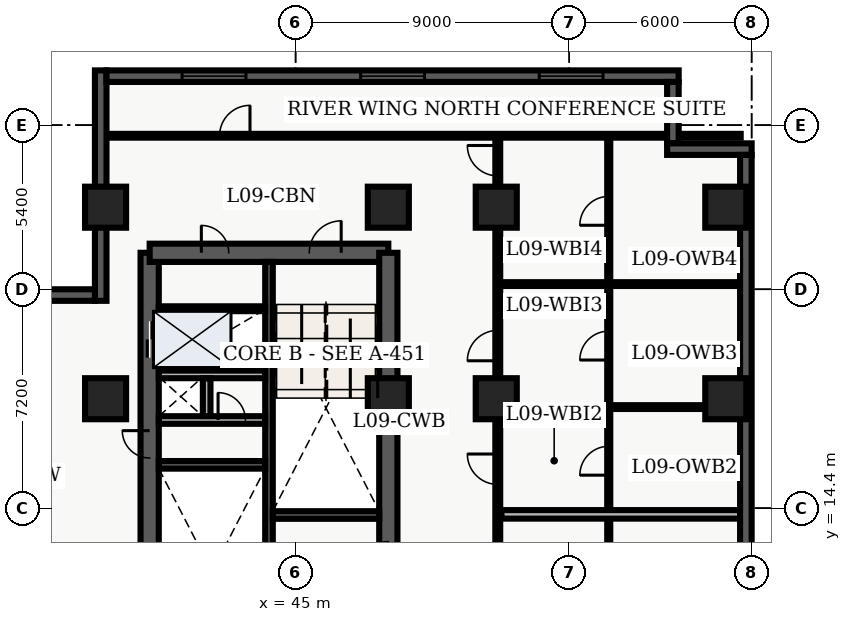
"""IFC4 building model, lengths in metres.
Left out: names, types, materials, properties, quantities, classifications, styles, units other than length and angle.
Written with IfcOpenShell. Run it as: python <this file> out.ifc"""

import sys

from ifc_helpers import new_model, entity, si_unit, converted_unit, direction, frame, origin_with_axes, origin_2d_with_axis, place, context, subcontext, project, spatial, polyline, rectangle, outline, extrude, element, fill, save


model = new_model("IFC4")
c1 = context("Model", 3, precision=1e-05, world=origin_with_axes(), true_north=direction((0.0, 1.0)))
c2 = subcontext(c1, "Body", "Model", "MODEL_VIEW")
j1 = project(units=[si_unit("LENGTHUNIT", "METRE"), converted_unit("PLANEANGLEUNIT", "DEGREE", entity("IfcPlaneAngleMeasure", 0.017), si_unit("PLANEANGLEUNIT", "RADIAN"), dimensions=[0, 0, 0, 0, 0, 0, 0])], contexts=[c1])
p1 = place(None, origin_with_axes())
s1 = spatial("IfcSite", under=j1, at=p1, CompositionType="ELEMENT")
p2 = place(p1, origin_with_axes())
s2 = spatial("IfcBuilding", under=s1, at=p2, CompositionType="ELEMENT")
p3 = place(p2, frame((0.0, 0.0, 40.5), z_axis=(0.0, 0.0, 1.0), x_axis=(1.0, 0.0, 0.0)))
s3 = spatial("IfcBuildingStorey", under=s2, at=p3, CompositionType="ELEMENT", Elevation=40.5)
p4 = place(p3, frame((40.2, 7.2, 0.0), z_axis=(0.0, 0.0, 1.0), x_axis=(0.0, 1.0, 0.0)))
e1 = element("IfcWall", 1, at=p4, inside=s3, PredefinedType="SHEAR", context=c2, shape_type="SweptSolid", body=[
    extrude(outline(polyline([(0.0, -0.3), (15.6, -0.3), (15.6, 0.3), (0.0, 0.3), (0.0, -0.3)])), origin_with_axes(), (0.0, 0.0, 1.0), 3.66),
])
p5 = place(p4, frame((12.75, 0.0, 0.0), z_axis=(0.0, 0.0, 1.0), x_axis=(1.0, 0.0, 0.0)))
e2 = element("IfcOpeningElement", 2, at=p5, cuts=e1, PredefinedType="OPENING", context=c2, shape_type="SweptSolid", body=[
    extrude(rectangle(XDim=1.2, YDim=0.62, at=origin_2d_with_axis()), origin_with_axes(), (0.0, 0.0, 1.0), 2.15),
])
p6 = place(p4, frame((9.3, 0.0, 0.0), z_axis=(0.0, 0.0, 1.0), x_axis=(1.0, 0.0, 0.0)))
e3 = element("IfcOpeningElement", 3, at=p6, cuts=e1, PredefinedType="OPENING", context=c2, shape_type="SweptSolid", body=[
    extrude(rectangle(XDim=0.9, YDim=0.62, at=origin_2d_with_axis()), origin_with_axes(), (0.0, 0.0, 1.0), 2.15),
])
p7 = place(p3, frame((40.2, 22.8, 0.0), z_axis=(0.0, 0.0, 1.0), x_axis=(1.0, 0.0, 0.0)))
e4 = element("IfcWall", 4, at=p7, inside=s3, PredefinedType="SHEAR", context=c2, shape_type="SweptSolid", body=[
    extrude(outline(polyline([(0.0, -0.3), (7.85, -0.3), (7.85, 0.3), (0.0, 0.3), (0.0, -0.3)])), origin_with_axes(), (0.0, 0.0, 1.0), 3.66),
])
p8 = place(p7, frame((5.775, 0.0, 0.0), z_axis=(0.0, 0.0, 1.0), x_axis=(1.0, 0.0, 0.0)))
e5 = element("IfcOpeningElement", 5, at=p8, cuts=e4, PredefinedType="OPENING", context=c2, shape_type="SweptSolid", body=[
    extrude(rectangle(XDim=1.05, YDim=0.62, at=origin_2d_with_axis()), origin_with_axes(), (0.0, 0.0, 1.0), 2.15),
])
p9 = place(p7, frame((2.15, 0.0, 0.0), z_axis=(0.0, 0.0, 1.0), x_axis=(1.0, 0.0, 0.0)))
e6 = element("IfcOpeningElement", 6, at=p9, cuts=e4, PredefinedType="OPENING", context=c2, shape_type="SweptSolid", body=[
    extrude(rectangle(XDim=0.9, YDim=0.62, at=origin_2d_with_axis()), origin_with_axes(), (0.0, 0.0, 1.0), 2.15),
])
p10 = place(p3, frame((48.05, 7.2, 0.0), z_axis=(0.0, 0.0, 1.0), x_axis=(0.0, 1.0, 0.0)))
e7 = element("IfcWall", 7, at=p10, inside=s3, PredefinedType="SHEAR", context=c2, shape_type="SweptSolid", body=[
    extrude(outline(polyline([(0.0, -0.3), (15.6, -0.3), (15.6, 0.3), (0.0, 0.3), (0.0, -0.3)])), origin_with_axes(), (0.0, 0.0, 1.0), 3.66),
])
p11 = place(p10, frame((1.425, 0.0, 0.0), z_axis=(0.0, 0.0, 1.0), x_axis=(1.0, 0.0, 0.0)))
e8 = element("IfcOpeningElement", 8, at=p11, cuts=e7, PredefinedType="OPENING", context=c2, shape_type="SweptSolid", body=[
    extrude(rectangle(XDim=1.05, YDim=0.62, at=origin_2d_with_axis()), origin_with_axes(), (0.0, 0.0, 1.0), 2.15),
])
p12 = place(p10, frame((3.475, 0.0, 0.0), z_axis=(0.0, 0.0, 1.0), x_axis=(1.0, 0.0, 0.0)))
e9 = element("IfcOpeningElement", 9, at=p12, cuts=e7, PredefinedType="OPENING", context=c2, shape_type="SweptSolid", body=[
    extrude(rectangle(XDim=1.05, YDim=0.62, at=origin_2d_with_axis()), origin_with_axes(), (0.0, 0.0, 1.0), 2.15),
])
p13 = place(p10, frame((5.625, 0.0, 0.0), z_axis=(0.0, 0.0, 1.0), x_axis=(1.0, 0.0, 0.0)))
e10 = element("IfcOpeningElement", 10, at=p13, cuts=e7, PredefinedType="OPENING", context=c2, shape_type="SweptSolid", body=[
    extrude(rectangle(XDim=0.95, YDim=0.62, at=origin_2d_with_axis()), origin_with_axes(), (0.0, 0.0, 1.0), 2.15),
])
p14 = place(p3, frame((44.125, 7.5, 0.0), z_axis=(0.0, 0.0, 1.0), x_axis=(0.0, 1.0, 0.0)))
e11 = element("IfcWall", 11, at=p14, inside=s3, PredefinedType="SHEAR", context=c2, shape_type="SweptSolid", body=[
    extrude(outline(polyline([(0.0, -0.125), (15.0, -0.125), (15.0, 0.125), (0.0, 0.125), (0.0, -0.125)])), origin_with_axes(), (0.0, 0.0, 1.0), 3.66),
])
for number, where, z_axis, x_axis in (
    (12, (40.5, 15.825, 0.0), (0.0, 0.0, 1.0), (1.0, 0.0, 0.0)),
    (13, (44.25, 14.175, 0.0), (0.0, 0.0, 1.0), (1.0, 0.0, 0.0)),
):
    element("IfcWall", number, at=place(p3, frame(where, z_axis=z_axis, x_axis=x_axis)), inside=s3, PredefinedType="SHEAR", context=c2, shape_type="SweptSolid", body=[
        extrude(outline(polyline([(0.0, -0.125), (3.5, -0.125), (3.5, 0.125), (0.0, 0.125), (0.0, -0.125)])), origin_with_axes(), (0.0, 0.0, 1.0), 3.66),
    ])
p15 = place(p3, frame((40.5, 17.3, 0.0), z_axis=(0.0, 0.0, 1.0), x_axis=(1.0, 0.0, 0.0)))
e14 = element("IfcWall", 14, at=p15, inside=s3, PredefinedType="SOLIDWALL", context=c2, shape_type="SweptSolid", body=[
    extrude(outline(polyline([(0.0, -0.125), (3.5, -0.125), (3.5, 0.125), (0.0, 0.125), (0.0, -0.125)])), origin_with_axes(), (0.0, 0.0, 1.0), 2.7),
])
p16 = place(p15, frame((2.4, 0.0, 0.0), z_axis=(0.0, 0.0, 1.0), x_axis=(1.0, 0.0, 0.0)))
e15 = element("IfcOpeningElement", 15, at=p16, cuts=e14, PredefinedType="OPENING", context=c2, shape_type="SweptSolid", body=[
    extrude(rectangle(XDim=0.9, YDim=0.27, at=origin_2d_with_axis()), origin_with_axes(), (0.0, 0.0, 1.0), 2.15),
])
p17 = place(p3, frame((40.5, 18.8, 0.0), z_axis=(0.0, 0.0, 1.0), x_axis=(1.0, 0.0, 0.0)))
e16 = element("IfcWall", 16, at=p17, inside=s3, PredefinedType="SOLIDWALL", context=c2, shape_type="SweptSolid", body=[
    extrude(outline(polyline([(0.0, -0.125), (3.5, -0.125), (3.5, 0.125), (0.0, 0.125), (0.0, -0.125)])), origin_with_axes(), (0.0, 0.0, 1.0), 2.7),
])
p18 = place(p3, frame((42.075, 17.43, 0.0), z_axis=(0.0, 0.0, 1.0), x_axis=(0.0, 1.0, 0.0)))
e17 = element("IfcWall", 17, at=p18, inside=s3, PredefinedType="SOLIDWALL", context=c2, shape_type="SweptSolid", body=[
    extrude(outline(polyline([(0.0, -0.125), (1.24, -0.125), (1.24, 0.125), (0.0, 0.125), (0.0, -0.125)])), origin_with_axes(), (0.0, 0.0, 1.0), 2.7),
])
for number, where, z_axis, x_axis in (
    (18, (38.75, 18.0, 0.0), (0.0, 0.0, 1.0), (1.0, 0.0, 0.0)),
    (19, (38.75, 24.3, 0.0), (0.0, 0.0, 1.0), (1.0, 0.0, 0.0)),
    (20, (48.05, 18.0, 0.0), (0.0, 0.0, 1.0), (1.0, 0.0, 0.0)),
    (21, (48.05, 24.3, 0.0), (0.0, 0.0, 1.0), (1.0, 0.0, 0.0)),
    (22, (51.6, 18.0, 0.0), (0.0, 0.0, 1.0), (1.0, 0.0, 0.0)),
    (23, (51.6, 24.3, 0.0), (0.0, 0.0, 1.0), (1.0, 0.0, 0.0)),
    (24, (59.15, 18.0, 0.0), (0.0, 0.0, 1.0), (1.0, 0.0, 0.0)),
    (25, (59.15, 24.3, 0.0), (0.0, 0.0, 1.0), (1.0, 0.0, 0.0)),
):
    element("IfcColumn", number, at=place(p3, frame(where, z_axis=z_axis, x_axis=x_axis)), inside=s3, PredefinedType="COLUMN", context=c2, shape_type="SweptSolid", body=[
        extrude(rectangle(XDim=1.35, YDim=1.35, at=origin_2d_with_axis()), origin_with_axes(), (0.0, 0.0, 1.0), 3.9),
    ])
p19 = place(p3, frame((40.5, 20.96, 0.0), z_axis=(0.0, 0.0, 1.0), x_axis=(1.0, 0.0, 0.0)))
e26 = element("IfcWall", 26, at=p19, inside=s3, PredefinedType="PARTITIONING", context=c2, shape_type="SweptSolid", body=[
    extrude(outline(polyline([(0.0, -0.08), (3.5, -0.08), (3.5, 0.08), (0.0, 0.08), (0.0, -0.08)])), origin_with_axes(), (0.0, 0.0, 1.0), 2.7),
])
p20 = place(p3, frame((51.65, 7.85, 0.0), z_axis=(0.0, 0.0, 1.0), x_axis=(0.0, 1.0, 0.0)))
e27 = element("IfcWall", 27, at=p20, inside=s3, PredefinedType="PARTITIONING", context=c2, shape_type="SweptSolid", body=[
    extrude(outline(polyline([(0.0, -0.08), (18.8, -0.08), (18.8, 0.08), (0.0, 0.08), (0.0, -0.08)])), origin_with_axes(), (0.0, 0.0, 1.0), 2.7),
])
p21 = place(p20, frame((4.453, 0.0, 0.0), z_axis=(0.0, 0.0, 1.0), x_axis=(1.0, 0.0, 0.0)))
e28 = element("IfcOpeningElement", 28, at=p21, cuts=e27, PredefinedType="OPENING", context=c2, shape_type="SweptSolid", body=[
    extrude(rectangle(XDim=1.0, YDim=0.18, at=origin_2d_with_axis()), origin_with_axes(), (0.0, 0.0, 1.0), 2.15),
])
p22 = place(p20, frame((7.831, 0.0, 0.0), z_axis=(0.0, 0.0, 1.0), x_axis=(1.0, 0.0, 0.0)))
e29 = element("IfcOpeningElement", 29, at=p22, cuts=e27, PredefinedType="OPENING", context=c2, shape_type="SweptSolid", body=[
    extrude(rectangle(XDim=1.0, YDim=0.18, at=origin_2d_with_axis()), origin_with_axes(), (0.0, 0.0, 1.0), 2.15),
])
p23 = place(p20, frame((11.898, 0.0, 0.0), z_axis=(0.0, 0.0, 1.0), x_axis=(1.0, 0.0, 0.0)))
e30 = element("IfcOpeningElement", 30, at=p23, cuts=e27, PredefinedType="OPENING", context=c2, shape_type="SweptSolid", body=[
    extrude(rectangle(XDim=1.0, YDim=0.18, at=origin_2d_with_axis()), origin_with_axes(), (0.0, 0.0, 1.0), 2.15),
])
p24 = place(p20, frame((17.98, 0.0, 0.0), z_axis=(0.0, 0.0, 1.0), x_axis=(1.0, 0.0, 0.0)))
e31 = element("IfcOpeningElement", 31, at=p24, cuts=e27, PredefinedType="OPENING", context=c2, shape_type="SweptSolid", body=[
    extrude(rectangle(XDim=1.0, YDim=0.18, at=origin_2d_with_axis()), origin_with_axes(), (0.0, 0.0, 1.0), 2.15),
])
p25 = place(p3, frame((38.76, 26.65, 0.0), z_axis=(0.0, 0.0, 1.0), x_axis=(1.0, 0.0, 0.0)))
e32 = element("IfcWall", 32, at=p25, inside=s3, PredefinedType="PARTITIONING", context=c2, shape_type="SweptSolid", body=[
    extrude(outline(polyline([(0.0, -0.062), (20.88, -0.062), (20.88, 0.062), (0.0, 0.062), (0.0, -0.062)])), origin_with_axes(), (0.0, 0.0, 1.0), 2.7),
])
p26 = place(p25, frame((4.24, 0.0, 0.0), z_axis=(0.0, 0.0, 1.0), x_axis=(1.0, 0.0, 0.0)))
e33 = element("IfcOpeningElement", 33, at=p26, cuts=e32, PredefinedType="OPENING", context=c2, shape_type="SweptSolid", body=[
    extrude(rectangle(XDim=1.0, YDim=0.145, at=origin_2d_with_axis()), origin_with_axes(), (0.0, 0.0, 1.0), 2.15),
])
p27 = place(p3, frame((55.3, 7.98, 0.0), z_axis=(0.0, 0.0, 1.0), x_axis=(0.0, 1.0, 0.0)))
e34 = element("IfcWall", 34, at=p27, inside=s3, PredefinedType="PARTITIONING", context=c2, shape_type="SweptSolid", body=[
    extrude(outline(polyline([(0.0, -0.05), (18.54, -0.05), (18.54, 0.05), (0.0, 0.05), (0.0, -0.05)])), origin_with_axes(), (0.0, 0.0, 1.0), 2.7),
])
p28 = place(p27, frame((3.073, 0.0, 0.0), z_axis=(0.0, 0.0, 1.0), x_axis=(1.0, 0.0, 0.0)))
e35 = element("IfcOpeningElement", 35, at=p28, cuts=e34, PredefinedType="OPENING", context=c2, shape_type="SweptSolid", body=[
    extrude(rectangle(XDim=0.95, YDim=0.12, at=origin_2d_with_axis()), origin_with_axes(), (0.0, 0.0, 1.0), 2.15),
])
p29 = place(p27, frame((7.981, 0.0, 0.0), z_axis=(0.0, 0.0, 1.0), x_axis=(1.0, 0.0, 0.0)))
e36 = element("IfcOpeningElement", 36, at=p29, cuts=e34, PredefinedType="OPENING", context=c2, shape_type="SweptSolid", body=[
    extrude(rectangle(XDim=0.95, YDim=0.12, at=origin_2d_with_axis()), origin_with_axes(), (0.0, 0.0, 1.0), 2.15),
])
p30 = place(p27, frame((11.768, 0.0, 0.0), z_axis=(0.0, 0.0, 1.0), x_axis=(1.0, 0.0, 0.0)))
e37 = element("IfcOpeningElement", 37, at=p30, cuts=e34, PredefinedType="OPENING", context=c2, shape_type="SweptSolid", body=[
    extrude(rectangle(XDim=0.95, YDim=0.12, at=origin_2d_with_axis()), origin_with_axes(), (0.0, 0.0, 1.0), 2.15),
])
p31 = place(p27, frame((16.201, 0.0, 0.0), z_axis=(0.0, 0.0, 1.0), x_axis=(1.0, 0.0, 0.0)))
e38 = element("IfcOpeningElement", 38, at=p31, cuts=e34, PredefinedType="OPENING", context=c2, shape_type="SweptSolid", body=[
    extrude(rectangle(XDim=0.95, YDim=0.12, at=origin_2d_with_axis()), origin_with_axes(), (0.0, 0.0, 1.0), 2.15),
])
p32 = place(p3, frame((51.77, 14.196, 0.0), z_axis=(0.0, 0.0, 1.0), x_axis=(1.0, 0.0, 0.0)))
e39 = element("IfcWall", 39, at=p32, inside=s3, PredefinedType="PARTITIONING", context=c2, shape_type="SweptSolid", body=[
    extrude(outline(polyline([(0.0, -0.14), (7.855, -0.14), (7.855, 0.14), (0.0, 0.14), (0.0, -0.14)])), origin_with_axes(), (0.0, 0.0, 1.0), 2.7),
])
for number, where, z_axis, x_axis in (
    (40, (51.77, 17.725, 0.0), (0.0, 0.0, 1.0), (1.0, 0.0, 0.0)),
    (41, (51.77, 21.771, 0.0), (0.0, 0.0, 1.0), (1.0, 0.0, 0.0)),
):
    element("IfcWall", number, at=place(p3, frame(where, z_axis=z_axis, x_axis=x_axis)), inside=s3, PredefinedType="PARTITIONING", context=c2, shape_type="SweptSolid", body=[
        extrude(outline(polyline([(0.0, -0.062), (7.855, -0.062), (7.855, 0.062), (0.0, 0.062), (0.0, -0.062)])), origin_with_axes(), (0.0, 0.0, 1.0), 2.7),
    ])
p33 = place(p3, frame((38.59, 21.22, 0.0), z_axis=(0.0, 0.0, 1.0), x_axis=(0.0, 1.0, 0.0)))
e42 = element("IfcWall", 42, at=p33, inside=s3, PredefinedType="SOLIDWALL", context=c2, shape_type="SweptSolid", body=[
    extrude(outline(polyline([(0.0, -0.19), (7.58, -0.19), (7.58, 0.19), (0.0, 0.19), (0.0, -0.19)])), origin_with_axes(), (0.0, 0.0, 1.0), 3.66),
])
p34 = place(p3, frame((38.78, 28.61, 0.0), z_axis=(0.0, 0.0, 1.0), x_axis=(1.0, 0.0, 0.0)))
e43 = element("IfcWall", 43, at=p34, inside=s3, PredefinedType="SOLIDWALL", context=c2, shape_type="SweptSolid", body=[
    extrude(outline(polyline([(0.0, -0.19), (18.82, -0.19), (18.82, 0.19), (0.0, 0.19), (0.0, -0.19)])), origin_with_axes(), (0.0, 0.0, 1.0), 3.66),
])
p35 = place(p34, frame((3.537, 0.0, 0.45), z_axis=(0.0, 0.0, 1.0), x_axis=(1.0, 0.0, 0.0)))
e44 = element("IfcOpeningElement", 44, at=p35, cuts=e43, PredefinedType="OPENING", context=c2, shape_type="SweptSolid", body=[
    extrude(rectangle(XDim=2.1, YDim=0.4, at=origin_2d_with_axis()), origin_with_axes(), (0.0, 0.0, 1.0), 2.2),
])
p36 = place(p34, frame((9.41, 0.0, 0.45), z_axis=(0.0, 0.0, 1.0), x_axis=(1.0, 0.0, 0.0)))
e45 = element("IfcOpeningElement", 45, at=p36, cuts=e43, PredefinedType="OPENING", context=c2, shape_type="SweptSolid", body=[
    extrude(rectangle(XDim=2.1, YDim=0.4, at=origin_2d_with_axis()), origin_with_axes(), (0.0, 0.0, 1.0), 2.2),
])
p37 = place(p34, frame((15.283, 0.0, 0.45), z_axis=(0.0, 0.0, 1.0), x_axis=(1.0, 0.0, 0.0)))
e46 = element("IfcOpeningElement", 46, at=p37, cuts=e43, PredefinedType="OPENING", context=c2, shape_type="SweptSolid", body=[
    extrude(rectangle(XDim=2.1, YDim=0.4, at=origin_2d_with_axis()), origin_with_axes(), (0.0, 0.0, 1.0), 2.2),
])
p38 = place(p3, frame((57.41, 28.42, 0.0), z_axis=(0.0, 0.0, 1.0), x_axis=(0.0, -1.0, 0.0)))
e47 = element("IfcWall", 47, at=p38, inside=s3, PredefinedType="SOLIDWALL", context=c2, shape_type="SweptSolid", body=[
    extrude(outline(polyline([(0.0, -0.19), (2.02, -0.19), (2.02, 0.19), (0.0, 0.19), (0.0, -0.19)])), origin_with_axes(), (0.0, 0.0, 1.0), 3.66),
])
p39 = place(p3, frame((57.22, 26.21, 0.0), z_axis=(0.0, 0.0, 1.0), x_axis=(1.0, 0.0, 0.0)))
e48 = element("IfcWall", 48, at=p39, inside=s3, PredefinedType="SOLIDWALL", context=c2, shape_type="SweptSolid", body=[
    extrude(outline(polyline([(0.0, -0.19), (2.78, -0.19), (2.78, 0.19), (0.0, 0.19), (0.0, -0.19)])), origin_with_axes(), (0.0, 0.0, 1.0), 3.66),
])
p40 = place(p3, frame((59.81, 26.02, 0.0), z_axis=(0.0, 0.0, 1.0), x_axis=(0.0, -1.0, 0.0)))
e49 = element("IfcWall", 49, at=p40, inside=s3, PredefinedType="SOLIDWALL", context=c2, shape_type="SweptSolid", body=[
    extrude(outline(polyline([(0.0, -0.19), (23.62, -0.19), (23.62, 0.19), (0.0, 0.19), (0.0, -0.19)])), origin_with_axes(), (0.0, 0.0, 1.0), 3.66),
])
p41 = place(p40, frame((20.218, 0.0, 0.45), z_axis=(0.0, 0.0, 1.0), x_axis=(1.0, 0.0, 0.0)))
e50 = element("IfcOpeningElement", 50, at=p41, cuts=e49, PredefinedType="OPENING", context=c2, shape_type="SweptSolid", body=[
    extrude(rectangle(XDim=2.1, YDim=0.4, at=origin_2d_with_axis()), origin_with_axes(), (0.0, 0.0, 1.0), 2.2),
])
p42 = place(p3, frame((21.22, 21.41, 0.0), z_axis=(0.0, 0.0, 1.0), x_axis=(1.0, 0.0, 0.0)))
e51 = element("IfcWall", 51, at=p42, inside=s3, PredefinedType="SOLIDWALL", context=c2, shape_type="SweptSolid", body=[
    extrude(outline(polyline([(0.0, -0.19), (17.18, -0.19), (17.18, 0.19), (0.0, 0.19), (0.0, -0.19)])), origin_with_axes(), (0.0, 0.0, 1.0), 3.66),
])
p43 = place(p42, frame((2.413, 0.0, 0.45), z_axis=(0.0, 0.0, 1.0), x_axis=(1.0, 0.0, 0.0)))
e52 = element("IfcOpeningElement", 52, at=p43, cuts=e51, PredefinedType="OPENING", context=c2, shape_type="SweptSolid", body=[
    extrude(rectangle(XDim=2.1, YDim=0.4, at=origin_2d_with_axis()), origin_with_axes(), (0.0, 0.0, 1.0), 2.2),
])
p44 = place(p42, frame((13.467, 0.0, 0.45), z_axis=(0.0, 0.0, 1.0), x_axis=(1.0, 0.0, 0.0)))
e53 = element("IfcOpeningElement", 53, at=p44, cuts=e51, PredefinedType="OPENING", context=c2, shape_type="SweptSolid", body=[
    extrude(rectangle(XDim=2.1, YDim=0.4, at=origin_2d_with_axis()), origin_with_axes(), (0.0, 0.0, 1.0), 2.2),
])
p45 = place(p4, frame((12.75, 0.0, 0.0), z_axis=(0.0, 0.0, 1.0), x_axis=(1.0, 0.0, 0.0)))
e54 = element("IfcDoor", 54, at=p45, inside=s3, OperationType="DOUBLE_DOOR_SLIDING", PredefinedType="DOOR", context=c2, shape_type="SweptSolid", body=[
    extrude(rectangle(XDim=1.2, YDim=0.09, at=origin_2d_with_axis()), origin_with_axes(), (0.0, 0.0, 1.0), 2.15),
])
fill(e2, e54)
p46 = place(p4, frame((9.3, 0.0, 0.0), z_axis=(0.0, 0.0, 1.0), x_axis=(1.0, 0.0, 0.0)))
e55 = element("IfcDoor", 55, at=p46, inside=s3, OperationType="SINGLE_SWING_RIGHT", PredefinedType="DOOR", context=c2, shape_type="SweptSolid", body=[
    extrude(rectangle(XDim=0.9, YDim=0.09, at=origin_2d_with_axis()), origin_with_axes(), (0.0, 0.0, 1.0), 2.15),
])
fill(e3, e55)
p47 = place(p15, frame((2.4, 0.0, 0.0), z_axis=(0.0, 0.0, 1.0), x_axis=(1.0, 0.0, 0.0)))
e56 = element("IfcDoor", 56, at=p47, inside=s3, OperationType="SINGLE_SWING_LEFT", PredefinedType="DOOR", context=c2, shape_type="SweptSolid", body=[
    extrude(rectangle(XDim=0.9, YDim=0.09, at=origin_2d_with_axis()), origin_with_axes(), (0.0, 0.0, 1.0), 2.15),
])
fill(e15, e56)
p48 = place(p7, frame((5.775, 0.0, 0.0), z_axis=(0.0, 0.0, 1.0), x_axis=(1.0, 0.0, 0.0)))
e57 = element("IfcDoor", 57, at=p48, inside=s3, OperationType="SINGLE_SWING_RIGHT", PredefinedType="DOOR", context=c2, shape_type="SweptSolid", body=[
    extrude(rectangle(XDim=1.05, YDim=0.09, at=origin_2d_with_axis()), origin_with_axes(), (0.0, 0.0, 1.0), 2.15),
])
fill(e5, e57)
p49 = place(p7, frame((2.15, 0.0, 0.0), z_axis=(0.0, 0.0, 1.0), x_axis=(1.0, 0.0, 0.0)))
e58 = element("IfcDoor", 58, at=p49, inside=s3, OperationType="SINGLE_SWING_LEFT", PredefinedType="DOOR", context=c2, shape_type="SweptSolid", body=[
    extrude(rectangle(XDim=0.9, YDim=0.09, at=origin_2d_with_axis()), origin_with_axes(), (0.0, 0.0, 1.0), 2.15),
])
fill(e6, e58)
p50 = place(p10, frame((5.625, 0.0, 0.0), z_axis=(0.0, 0.0, 1.0), x_axis=(1.0, 0.0, 0.0)))
e59 = element("IfcDoor", 59, at=p50, inside=s3, OperationType="SINGLE_SWING_LEFT", PredefinedType="DOOR", context=c2, shape_type="SweptSolid", body=[
    extrude(rectangle(XDim=0.95, YDim=0.09, at=origin_2d_with_axis()), origin_with_axes(), (0.0, 0.0, 1.0), 2.15),
])
fill(e10, e59)
p51 = place(p25, frame((4.24, 0.0, 0.0), z_axis=(0.0, 0.0, 1.0), x_axis=(1.0, 0.0, 0.0)))
e60 = element("IfcDoor", 60, at=p51, inside=s3, OperationType="SINGLE_SWING_RIGHT", PredefinedType="DOOR", context=c2, shape_type="SweptSolid", body=[
    extrude(rectangle(XDim=1.0, YDim=0.075, at=origin_2d_with_axis()), origin_with_axes(), (0.0, 0.0, 1.0), 2.15),
])
fill(e33, e60)
p52 = place(p27, frame((7.981, 0.0, 0.0), z_axis=(0.0, 0.0, 1.0), x_axis=(1.0, 0.0, 0.0)))
e61 = element("IfcDoor", 61, at=p52, inside=s3, OperationType="SINGLE_SWING_LEFT", PredefinedType="DOOR", context=c2, shape_type="SweptSolid", body=[
    extrude(rectangle(XDim=0.95, YDim=0.06, at=origin_2d_with_axis()), origin_with_axes(), (0.0, 0.0, 1.0), 2.15),
])
fill(e36, e61)
p53 = place(p20, frame((7.831, 0.0, 0.0), z_axis=(0.0, 0.0, 1.0), x_axis=(1.0, 0.0, 0.0)))
e62 = element("IfcDoor", 62, at=p53, inside=s3, OperationType="SINGLE_SWING_RIGHT", PredefinedType="DOOR", context=c2, shape_type="SweptSolid", body=[
    extrude(rectangle(XDim=1.0, YDim=0.09, at=origin_2d_with_axis()), origin_with_axes(), (0.0, 0.0, 1.0), 2.15),
])
fill(e29, e62)
p54 = place(p27, frame((11.768, 0.0, 0.0), z_axis=(0.0, 0.0, 1.0), x_axis=(1.0, 0.0, 0.0)))
e63 = element("IfcDoor", 63, at=p54, inside=s3, OperationType="SINGLE_SWING_LEFT", PredefinedType="DOOR", context=c2, shape_type="SweptSolid", body=[
    extrude(rectangle(XDim=0.95, YDim=0.06, at=origin_2d_with_axis()), origin_with_axes(), (0.0, 0.0, 1.0), 2.15),
])
fill(e37, e63)
p55 = place(p20, frame((11.898, 0.0, 0.0), z_axis=(0.0, 0.0, 1.0), x_axis=(1.0, 0.0, 0.0)))
e64 = element("IfcDoor", 64, at=p55, inside=s3, OperationType="SINGLE_SWING_LEFT", PredefinedType="DOOR", context=c2, shape_type="SweptSolid", body=[
    extrude(rectangle(XDim=1.0, YDim=0.09, at=origin_2d_with_axis()), origin_with_axes(), (0.0, 0.0, 1.0), 2.15),
])
fill(e30, e64)
p56 = place(p27, frame((16.201, 0.0, 0.0), z_axis=(0.0, 0.0, 1.0), x_axis=(1.0, 0.0, 0.0)))
e65 = element("IfcDoor", 65, at=p56, inside=s3, OperationType="SINGLE_SWING_LEFT", PredefinedType="DOOR", context=c2, shape_type="SweptSolid", body=[
    extrude(rectangle(XDim=0.95, YDim=0.06, at=origin_2d_with_axis()), origin_with_axes(), (0.0, 0.0, 1.0), 2.15),
])
fill(e38, e65)
p57 = place(p20, frame((17.98, 0.0, 0.0), z_axis=(0.0, 0.0, 1.0), x_axis=(1.0, 0.0, 0.0)))
e66 = element("IfcDoor", 66, at=p57, inside=s3, OperationType="SINGLE_SWING_RIGHT", PredefinedType="DOOR", context=c2, shape_type="SweptSolid", body=[
    extrude(rectangle(XDim=1.0, YDim=0.09, at=origin_2d_with_axis()), origin_with_axes(), (0.0, 0.0, 1.0), 2.15),
])
fill(e31, e66)
p58 = place(p34, frame((3.537, 0.0, 0.45), z_axis=(0.0, 0.0, 1.0), x_axis=(1.0, 0.0, 0.0)))
e67 = element("IfcWindow", 67, at=p58, inside=s3, PredefinedType="WINDOW", context=c2, shape_type="SweptSolid", body=[
    extrude(rectangle(XDim=2.1, YDim=0.09, at=origin_2d_with_axis()), origin_with_axes(), (0.0, 0.0, 1.0), 2.2),
])
fill(e44, e67)
p59 = place(p34, frame((9.41, 0.0, 0.45), z_axis=(0.0, 0.0, 1.0), x_axis=(1.0, 0.0, 0.0)))
e68 = element("IfcWindow", 68, at=p59, inside=s3, PredefinedType="WINDOW", context=c2, shape_type="SweptSolid", body=[
    extrude(rectangle(XDim=2.1, YDim=0.09, at=origin_2d_with_axis()), origin_with_axes(), (0.0, 0.0, 1.0), 2.2),
])
fill(e45, e68)
p60 = place(p34, frame((15.283, 0.0, 0.45), z_axis=(0.0, 0.0, 1.0), x_axis=(1.0, 0.0, 0.0)))
e69 = element("IfcWindow", 69, at=p60, inside=s3, PredefinedType="WINDOW", context=c2, shape_type="SweptSolid", body=[
    extrude(rectangle(XDim=2.1, YDim=0.09, at=origin_2d_with_axis()), origin_with_axes(), (0.0, 0.0, 1.0), 2.2),
])
fill(e46, e69)
save(model, sys.argv[1])
